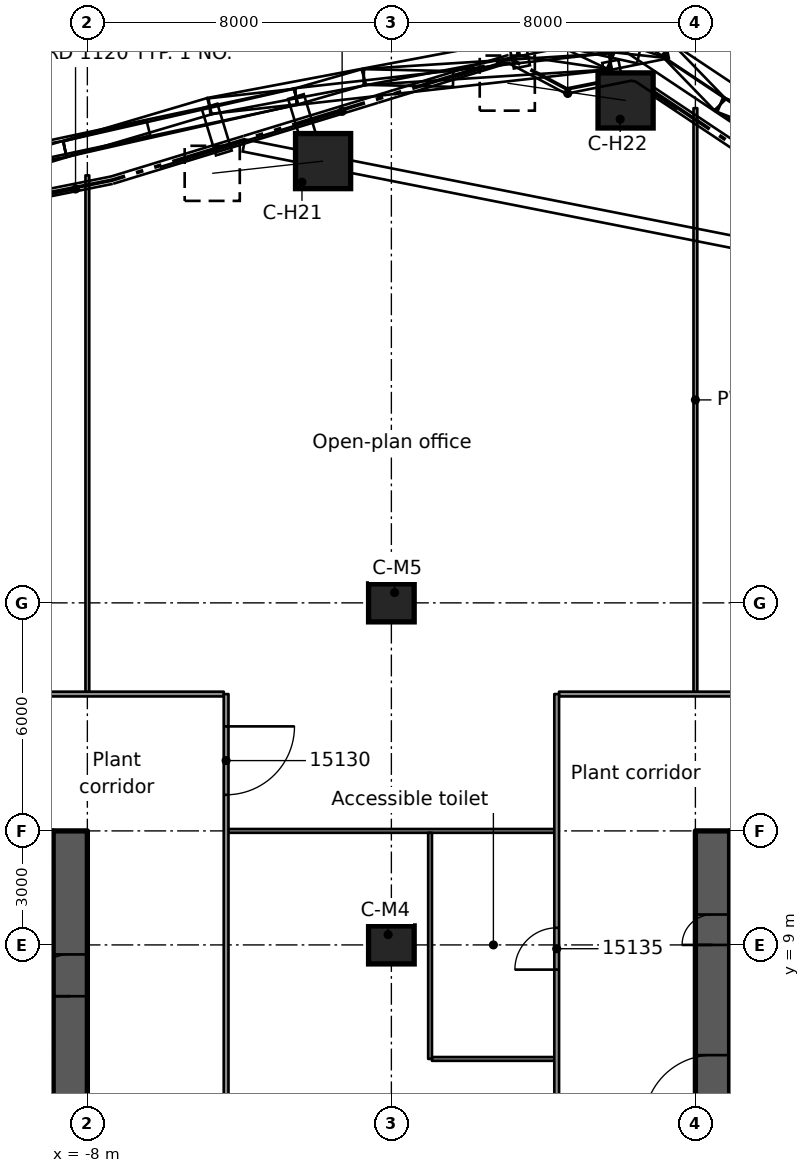
"""IFC4 building model, lengths in metres.
Left out: names, types, materials, properties, quantities, classifications, styles, units other than length and angle.
Written with IfcOpenShell. Run it as: python <this file> out.ifc"""

import sys

from ifc_helpers import new_model, si_unit, direction, frame, frame_2d, origin, origin_2d, place, context, subcontext, project, spatial, rectangle, extrude, element, fill, save


model = new_model("IFC4")
c1 = context("Model", 3, precision=1e-05, world=origin(), true_north=direction((0.0, 1.0)))
c2 = subcontext(c1, "Body", "Model", "MODEL_VIEW")
j1 = project(units=[si_unit("LENGTHUNIT", "METRE"), si_unit("PLANEANGLEUNIT", "RADIAN")], contexts=[c1])
p1 = place(None, origin())
s1 = spatial("IfcSite", under=j1, at=p1, CompositionType="ELEMENT")
p2 = place(p1, origin())
s2 = spatial("IfcBuilding", under=s1, at=p2, CompositionType="ELEMENT")
p3 = place(p2, frame((0.0, 0.0, 76.3)))
s3 = spatial("IfcBuildingStorey", under=s2, at=p3, CompositionType="ELEMENT", Elevation=76.3)
p4 = place(p3, frame((-18.1, 11.55, 0.0), z_axis=(0.0, 0.0, 1.0), x_axis=(1.0, 0.0, 0.0)))
e1 = element("IfcWall", 1, at=p4, inside=s3, PredefinedType="SHEAR", context=c2, shape_type="SweptSolid", body=[
    extrude(rectangle(XDim=9.2, YDim=0.9, at=frame_2d((4.6, 0.0))), origin(), (0.0, 0.0, 1.0), 4.4),
])
p5 = place(p4, frame((5.1, 0.0, 0.0)))
e2 = element("IfcOpeningElement", 2, at=p5, cuts=e1, PredefinedType="OPENING", context=c2, shape_type="SweptSolid", body=[
    extrude(rectangle(XDim=1.1, YDim=2.1, at=frame_2d((0.55, 1.05))), frame((0.0, 0.46, 0.0), z_axis=(0.0, -1.0, 0.0), x_axis=(1.0, 0.0, 0.0)), (0.0, 0.0, 1.0), 0.92),
])
p6 = place(p3, frame((-8.45, -12.0, 0.0), z_axis=(0.0, 0.0, 1.0), x_axis=(0.0, 1.0, 0.0)))
e3 = element("IfcWall", 3, at=p6, inside=s3, PredefinedType="SHEAR", context=c2, shape_type="SweptSolid", body=[
    extrude(rectangle(XDim=24.0, YDim=0.9, at=frame_2d((12.0, 0.0))), origin(), (0.0, 0.0, 1.0), 4.4),
])
p7 = place(p6, frame((9.6, 0.0, 0.0)))
e4 = element("IfcOpeningElement", 4, at=p7, cuts=e3, PredefinedType="OPENING", context=c2, shape_type="SweptSolid", body=[
    extrude(rectangle(XDim=1.8, YDim=2.1, at=frame_2d((0.9, 1.05))), frame((0.0, 0.46, 0.0), z_axis=(0.0, -1.0, 0.0), x_axis=(1.0, 0.0, 0.0)), (0.0, 0.0, 1.0), 0.92),
])
p8 = place(p6, frame((5.9, 0.0, 0.0)))
e5 = element("IfcOpeningElement", 5, at=p8, cuts=e3, PredefinedType="OPENING", context=c2, shape_type="SweptSolid", body=[
    extrude(rectangle(XDim=1.8, YDim=2.1, at=frame_2d((0.9, 1.05))), frame((0.0, 0.46, 0.0), z_axis=(0.0, -1.0, 0.0), x_axis=(1.0, 0.0, 0.0)), (0.0, 0.0, 1.0), 0.92),
])
p9 = place(p6, frame((12.6, 0.0, 0.0)))
e6 = element("IfcOpeningElement", 6, at=p9, cuts=e3, PredefinedType="OPENING", context=c2, shape_type="SweptSolid", body=[
    extrude(rectangle(XDim=1.8, YDim=2.1, at=frame_2d((0.9, 1.05))), frame((0.0, 0.46, 0.0), z_axis=(0.0, -1.0, 0.0), x_axis=(1.0, 0.0, 0.0)), (0.0, 0.0, 1.0), 0.92),
])
p10 = place(p6, frame((19.65, 0.0, 0.0)))
e7 = element("IfcOpeningElement", 7, at=p10, cuts=e3, PredefinedType="OPENING", context=c2, shape_type="SweptSolid", body=[
    extrude(rectangle(XDim=1.1, YDim=2.1, at=frame_2d((0.55, 1.05))), frame((0.0, 0.46, 0.0), z_axis=(0.0, -1.0, 0.0), x_axis=(1.0, 0.0, 0.0)), (0.0, 0.0, 1.0), 0.92),
])
p11 = place(p6, frame((2.2, 0.0, 0.0)))
e8 = element("IfcOpeningElement", 8, at=p11, cuts=e3, PredefinedType="OPENING", context=c2, shape_type="SweptSolid", body=[
    extrude(rectangle(XDim=0.8, YDim=2.1, at=frame_2d((0.4, 1.05))), frame((0.0, 0.46, 0.0), z_axis=(0.0, -1.0, 0.0), x_axis=(1.0, 0.0, 0.0)), (0.0, 0.0, 1.0), 0.92),
])
p12 = place(p3, frame((8.9, 11.55, 0.0), z_axis=(0.0, 0.0, 1.0), x_axis=(1.0, 0.0, 0.0)))
e9 = element("IfcWall", 9, at=p12, inside=s3, PredefinedType="SHEAR", context=c2, shape_type="SweptSolid", body=[
    extrude(rectangle(XDim=9.2, YDim=0.9, at=frame_2d((4.6, 0.0))), origin(), (0.0, 0.0, 1.0), 4.4),
])
p13 = place(p12, frame((3.0, 0.0, 0.0)))
e10 = element("IfcOpeningElement", 10, at=p13, cuts=e9, PredefinedType="OPENING", context=c2, shape_type="SweptSolid", body=[
    extrude(rectangle(XDim=1.1, YDim=2.1, at=frame_2d((0.55, 1.05))), frame((0.0, 0.46, 0.0), z_axis=(0.0, -1.0, 0.0), x_axis=(1.0, 0.0, 0.0)), (0.0, 0.0, 1.0), 0.92),
])
p14 = place(p12, frame((0.77, 0.0, 0.0)))
e11 = element("IfcOpeningElement", 11, at=p14, cuts=e9, PredefinedType="OPENING", context=c2, shape_type="SweptSolid", body=[
    extrude(rectangle(XDim=0.9, YDim=2.1, at=frame_2d((0.45, 1.05))), frame((0.0, 0.46, 0.0), z_axis=(0.0, -1.0, 0.0), x_axis=(1.0, 0.0, 0.0)), (0.0, 0.0, 1.0), 0.92),
])
p15 = place(p3, frame((8.45, -12.0, 0.0), z_axis=(0.0, 0.0, 1.0), x_axis=(0.0, 1.0, 0.0)))
e12 = element("IfcWall", 12, at=p15, inside=s3, PredefinedType="SHEAR", context=c2, shape_type="SweptSolid", body=[
    extrude(rectangle(XDim=24.0, YDim=0.9, at=frame_2d((12.0, 0.0))), origin(), (0.0, 0.0, 1.0), 4.4),
])
p16 = place(p15, frame((12.6, 0.0, 0.0)))
e13 = element("IfcOpeningElement", 13, at=p16, cuts=e12, PredefinedType="OPENING", context=c2, shape_type="SweptSolid", body=[
    extrude(rectangle(XDim=1.8, YDim=2.1, at=frame_2d((0.9, 1.05))), frame((0.0, 0.46, 0.0), z_axis=(0.0, -1.0, 0.0), x_axis=(1.0, 0.0, 0.0)), (0.0, 0.0, 1.0), 0.92),
])
p17 = place(p15, frame((16.3, 0.0, 0.0)))
e14 = element("IfcOpeningElement", 14, at=p17, cuts=e12, PredefinedType="OPENING", context=c2, shape_type="SweptSolid", body=[
    extrude(rectangle(XDim=1.8, YDim=2.1, at=frame_2d((0.9, 1.05))), frame((0.0, 0.46, 0.0), z_axis=(0.0, -1.0, 0.0), x_axis=(1.0, 0.0, 0.0)), (0.0, 0.0, 1.0), 0.92),
])
p18 = place(p15, frame((9.6, 0.0, 0.0)))
e15 = element("IfcOpeningElement", 15, at=p18, cuts=e12, PredefinedType="OPENING", context=c2, shape_type="SweptSolid", body=[
    extrude(rectangle(XDim=1.8, YDim=2.1, at=frame_2d((0.9, 1.05))), frame((0.0, 0.46, 0.0), z_axis=(0.0, -1.0, 0.0), x_axis=(1.0, 0.0, 0.0)), (0.0, 0.0, 1.0), 0.92),
])
p19 = place(p15, frame((3.25, 0.0, 0.0)))
e16 = element("IfcOpeningElement", 16, at=p19, cuts=e12, PredefinedType="OPENING", context=c2, shape_type="SweptSolid", body=[
    extrude(rectangle(XDim=1.1, YDim=2.1, at=frame_2d((0.55, 1.05))), frame((0.0, 0.46, 0.0), z_axis=(0.0, -1.0, 0.0), x_axis=(1.0, 0.0, 0.0)), (0.0, 0.0, 1.0), 0.92),
])
p20 = place(p15, frame((21.0, 0.0, 0.0)))
e17 = element("IfcOpeningElement", 17, at=p20, cuts=e12, PredefinedType="OPENING", context=c2, shape_type="SweptSolid", body=[
    extrude(rectangle(XDim=0.8, YDim=2.1, at=frame_2d((0.4, 1.05))), frame((0.0, 0.46, 0.0), z_axis=(0.0, -1.0, 0.0), x_axis=(1.0, 0.0, 0.0)), (0.0, 0.0, 1.0), 0.92),
])
p21 = place(p3, frame((-1.797, 29.624, 0.469), z_axis=(-0.642678137038, -0.070948481985, 0.762844102735), x_axis=(0.1097284362, -0.993961604032, 0.0)))
e18 = element("IfcColumn", 18, at=p21, inside=s3, PredefinedType="COLUMN", context=c2, shape_type="SweptSolid", body=[
    extrude(rectangle(XDim=1.45, YDim=1.45, at=origin_2d()), origin(), (0.0, 0.0, 1.0), 4.539),
])
p22 = place(p3, frame((6.163, 31.22, 0.491), z_axis=(-0.670106023434, 0.098169402539, 0.735744986909), x_axis=(-0.144951118407, -0.989438817347, 0.0)))
e19 = element("IfcColumn", 19, at=p22, inside=s3, PredefinedType="COLUMN", context=c2, shape_type="SweptSolid", body=[
    extrude(rectangle(XDim=1.45, YDim=1.45, at=origin_2d()), origin(), (0.0, 0.0, 1.0), 4.646),
])
for number, where, z_axis, x_axis in (
    (20, (0.0, 9.0, 0.0), (0.0, 0.0, 1.0), (1.0, 0.0, 0.0)),
    (21, (0.0, 18.0, 0.0), (0.0, 0.0, 1.0), (1.0, 0.0, 0.0)),
):
    element("IfcColumn", number, at=place(p3, frame(where, z_axis=z_axis, x_axis=x_axis)), inside=s3, PredefinedType="COLUMN", context=c2, shape_type="SweptSolid", body=[
        extrude(rectangle(XDim=1.2, YDim=1.0, at=origin_2d()), origin(), (0.0, 0.0, 1.0), 4.4),
    ])
p23 = place(p3, frame((8.9, 6.875, 0.0), z_axis=(0.0, 0.0, 1.0), x_axis=(1.0, 0.0, 0.0)))
e22 = element("IfcWall", 22, at=p23, inside=s3, PredefinedType="PARTITIONING", context=c2, shape_type="SweptSolid", body=[
    extrude(rectangle(XDim=2.44, YDim=0.2, at=frame_2d((1.22, 0.0))), origin(), (0.0, 0.0, 1.0), 3.99),
])
p24 = place(p23, frame((0.72, 0.0, 0.0)))
e23 = element("IfcOpeningElement", 23, at=p24, cuts=e22, PredefinedType="OPENING", context=c2, shape_type="SweptSolid", body=[
    extrude(rectangle(XDim=1.0, YDim=2.1, at=frame_2d((0.5, 1.05))), frame((0.0, 0.11, 0.0), z_axis=(0.0, -1.0, 0.0), x_axis=(1.0, 0.0, 0.0)), (0.0, 0.0, 1.0), 0.22),
])
for number, where, z_axis, x_axis in (
    (24, (8.9, 10.0, 0.0), (0.0, 0.0, 1.0), (1.0, 0.0, 0.0)),
    (25, (8.9, 8.8, 0.0), (0.0, 0.0, 1.0), (1.0, 0.0, 0.0)),
):
    element("IfcWall", number, at=place(p3, frame(where, z_axis=z_axis, x_axis=x_axis)), inside=s3, PredefinedType="PARTITIONING", context=c2, shape_type="SweptSolid", body=[
        extrude(rectangle(XDim=2.44, YDim=0.2, at=frame_2d((1.22, 0.0))), origin(), (0.0, 0.0, 1.0), 3.99),
    ])
p25 = place(p3, frame((1.068, 6.0, 0.0), z_axis=(0.0, 0.0, 1.0), x_axis=(1.0, 0.0, 0.0)))
e26 = element("IfcWall", 26, at=p25, inside=s3, PredefinedType="PARTITIONING", context=c2, shape_type="SweptSolid", body=[
    extrude(rectangle(XDim=3.219, YDim=0.1, at=frame_2d((1.609, 0.0))), origin(), (0.0, 0.0, 1.0), 3.98),
])
p26 = place(p3, frame((-4.287, 12.0, 0.0), z_axis=(0.0, 0.0, 1.0), x_axis=(1.0, 0.0, 0.0)))
e27 = element("IfcWall", 27, at=p26, inside=s3, PredefinedType="PARTITIONING", context=c2, shape_type="SweptSolid", body=[
    extrude(rectangle(XDim=8.574, YDim=0.1, at=frame_2d((4.287, 0.0))), origin(), (0.0, 0.0, 1.0), 3.98),
])
for number, where, z_axis, x_axis in (
    (28, (-11.537, 15.601, 0.0), (0.0, 0.0, 1.0), (1.0, 0.0, 0.0)),
    (29, (4.412, 15.601, 0.0), (0.0, 0.0, 1.0), (1.0, 0.0, 0.0)),
):
    element("IfcWall", number, at=place(p3, frame(where, z_axis=z_axis, x_axis=x_axis)), inside=s3, PredefinedType="PARTITIONING", context=c2, shape_type="SweptSolid", body=[
        extrude(rectangle(XDim=7.125, YDim=0.125, at=frame_2d((3.562, 0.0))), origin(), (0.0, 0.0, 1.0), 3.98),
    ])
p27 = place(p3, frame((8.0, 15.664, 0.0), z_axis=(0.0, 0.0, 1.0), x_axis=(0.0, 1.0, 0.0)))
e30 = element("IfcWall", 30, at=p27, inside=s3, PredefinedType="PARTITIONING", context=c2, shape_type="SweptSolid", body=[
    extrude(rectangle(XDim=15.353, YDim=0.1, at=frame_2d((7.677, 0.0))), origin(), (0.0, 0.0, 1.0), 3.98),
])
p28 = place(p3, frame((4.35, -15.6, 0.0), z_axis=(0.0, 0.0, 1.0), x_axis=(0.0, 1.0, 0.0)))
e31 = element("IfcWall", 31, at=p28, inside=s3, PredefinedType="PARTITIONING", context=c2, shape_type="SweptSolid", body=[
    extrude(rectangle(XDim=31.201, YDim=0.125, at=frame_2d((15.601, 0.0))), origin(), (0.0, 0.0, 1.0), 3.98),
])
p29 = place(p28, frame((11.7, 0.0, 0.0)))
e32 = element("IfcOpeningElement", 32, at=p29, cuts=e31, PredefinedType="OPENING", context=c2, shape_type="SweptSolid", body=[
    extrude(rectangle(XDim=1.8, YDim=2.1, at=frame_2d((0.9, 1.05))), frame((0.0, 0.073, 0.0), z_axis=(0.0, -1.0, 0.0), x_axis=(1.0, 0.0, 0.0)), (0.0, 0.0, 1.0), 0.145),
])
p30 = place(p28, frame((23.95, 0.0, 0.0)))
e33 = element("IfcOpeningElement", 33, at=p30, cuts=e31, PredefinedType="OPENING", context=c2, shape_type="SweptSolid", body=[
    extrude(rectangle(XDim=1.1, YDim=2.1, at=frame_2d((0.55, 1.05))), frame((0.0, 0.073, 0.0), z_axis=(0.0, -1.0, 0.0), x_axis=(1.0, 0.0, 0.0)), (0.0, 0.0, 1.0), 0.145),
])
p31 = place(p3, frame((1.018, 6.0, 0.0), z_axis=(0.0, 0.0, 1.0), x_axis=(0.0, 1.0, 0.0)))
e34 = element("IfcWall", 34, at=p31, inside=s3, PredefinedType="PARTITIONING", context=c2, shape_type="SweptSolid", body=[
    extrude(rectangle(XDim=5.95, YDim=0.1, at=frame_2d((2.975, 0.0))), origin(), (0.0, 0.0, 1.0), 3.98),
])
p32 = place(p3, frame((-4.349, 15.6, 0.0), z_axis=(0.0, 0.0, 1.0), x_axis=(0.0, -1.0, 0.0)))
e35 = element("IfcWall", 35, at=p32, inside=s3, PredefinedType="PARTITIONING", context=c2, shape_type="SweptSolid", body=[
    extrude(rectangle(XDim=31.2, YDim=0.125, at=frame_2d((15.6, 0.0))), origin(), (0.0, 0.0, 1.0), 3.98),
])
p33 = place(p32, frame((28.45, 0.0, 0.0)))
e36 = element("IfcOpeningElement", 36, at=p33, cuts=e35, PredefinedType="OPENING", context=c2, shape_type="SweptSolid", body=[
    extrude(rectangle(XDim=1.8, YDim=2.1, at=frame_2d((0.9, 1.05))), frame((0.0, 0.073, 0.0), z_axis=(0.0, -1.0, 0.0), x_axis=(1.0, 0.0, 0.0)), (0.0, 0.0, 1.0), 0.145),
])
p34 = place(p32, frame((0.85, 0.0, 0.0)))
e37 = element("IfcOpeningElement", 37, at=p34, cuts=e35, PredefinedType="OPENING", context=c2, shape_type="SweptSolid", body=[
    extrude(rectangle(XDim=1.8, YDim=2.1, at=frame_2d((0.9, 1.05))), frame((0.0, 0.073, 0.0), z_axis=(0.0, -1.0, 0.0), x_axis=(1.0, 0.0, 0.0)), (0.0, 0.0, 1.0), 0.145),
])
p35 = place(p32, frame((24.2, 0.0, 0.0)))
e38 = element("IfcOpeningElement", 38, at=p35, cuts=e35, PredefinedType="OPENING", context=c2, shape_type="SweptSolid", body=[
    extrude(rectangle(XDim=0.9, YDim=2.1, at=frame_2d((0.45, 1.05))), frame((0.0, 0.073, 0.0), z_axis=(0.0, -1.0, 0.0), x_axis=(1.0, 0.0, 0.0)), (0.0, 0.0, 1.0), 0.145),
])
p36 = place(p3, frame((-8.0, 15.664, 0.0), z_axis=(0.0, 0.0, 1.0), x_axis=(0.0, 1.0, 0.0)))
e39 = element("IfcWall", 39, at=p36, inside=s3, PredefinedType="PARTITIONING", context=c2, shape_type="SweptSolid", body=[
    extrude(rectangle(XDim=13.584, YDim=0.1, at=frame_2d((6.792, 0.0))), origin(), (0.0, 0.0, 1.0), 3.98),
])
p37 = place(p10, origin())
e40 = element("IfcDoor", 40, at=p37, inside=s3, OperationType="SINGLE_SWING_RIGHT", PredefinedType="DOOR", context=c2, shape_type="SweptSolid", body=[
    extrude(rectangle(XDim=1.1, YDim=2.1, at=frame_2d((0.55, 1.05))), frame((0.0, 0.025, 0.0), z_axis=(0.0, -1.0, 0.0), x_axis=(1.0, 0.0, 0.0)), (0.0, 0.0, 1.0), 0.05),
])
fill(e7, e40)
p38 = place(p17, origin())
e41 = element("IfcDoor", 41, at=p38, inside=s3, OperationType="SINGLE_SWING_RIGHT", PredefinedType="DOOR", context=c2, shape_type="SweptSolid", body=[
    extrude(rectangle(XDim=1.8, YDim=2.1, at=frame_2d((0.9, 1.05))), frame((0.0, 0.025, 0.0), z_axis=(0.0, -1.0, 0.0), x_axis=(1.0, 0.0, 0.0)), (0.0, 0.0, 1.0), 0.05),
])
fill(e14, e41)
p39 = place(p20, origin())
e42 = element("IfcDoor", 42, at=p39, inside=s3, OperationType="SINGLE_SWING_RIGHT", PredefinedType="DOOR", context=c2, shape_type="SweptSolid", body=[
    extrude(rectangle(XDim=0.8, YDim=2.1, at=frame_2d((0.4, 1.05))), frame((0.0, 0.025, 0.0), z_axis=(0.0, -1.0, 0.0), x_axis=(1.0, 0.0, 0.0)), (0.0, 0.0, 1.0), 0.05),
])
fill(e17, e42)
p40 = place(p34, origin())
e43 = element("IfcDoor", 43, at=p40, inside=s3, OperationType="DOUBLE_DOOR_SINGLE_SWING", PredefinedType="DOOR", context=c2, shape_type="SweptSolid", body=[
    extrude(rectangle(XDim=1.8, YDim=2.1, at=frame_2d((0.9, 1.05))), frame((0.0, 0.025, 0.0), z_axis=(0.0, -1.0, 0.0), x_axis=(1.0, 0.0, 0.0)), (0.0, 0.0, 1.0), 0.05),
])
fill(e37, e43)
p41 = place(p30, origin())
e44 = element("IfcDoor", 44, at=p41, inside=s3, OperationType="SINGLE_SWING_RIGHT", PredefinedType="DOOR", context=c2, shape_type="SweptSolid", body=[
    extrude(rectangle(XDim=1.1, YDim=2.1, at=frame_2d((0.55, 1.05))), frame((0.0, 0.025, 0.0), z_axis=(0.0, -1.0, 0.0), x_axis=(1.0, 0.0, 0.0)), (0.0, 0.0, 1.0), 0.05),
])
fill(e33, e44)
save(model, sys.argv[1])
